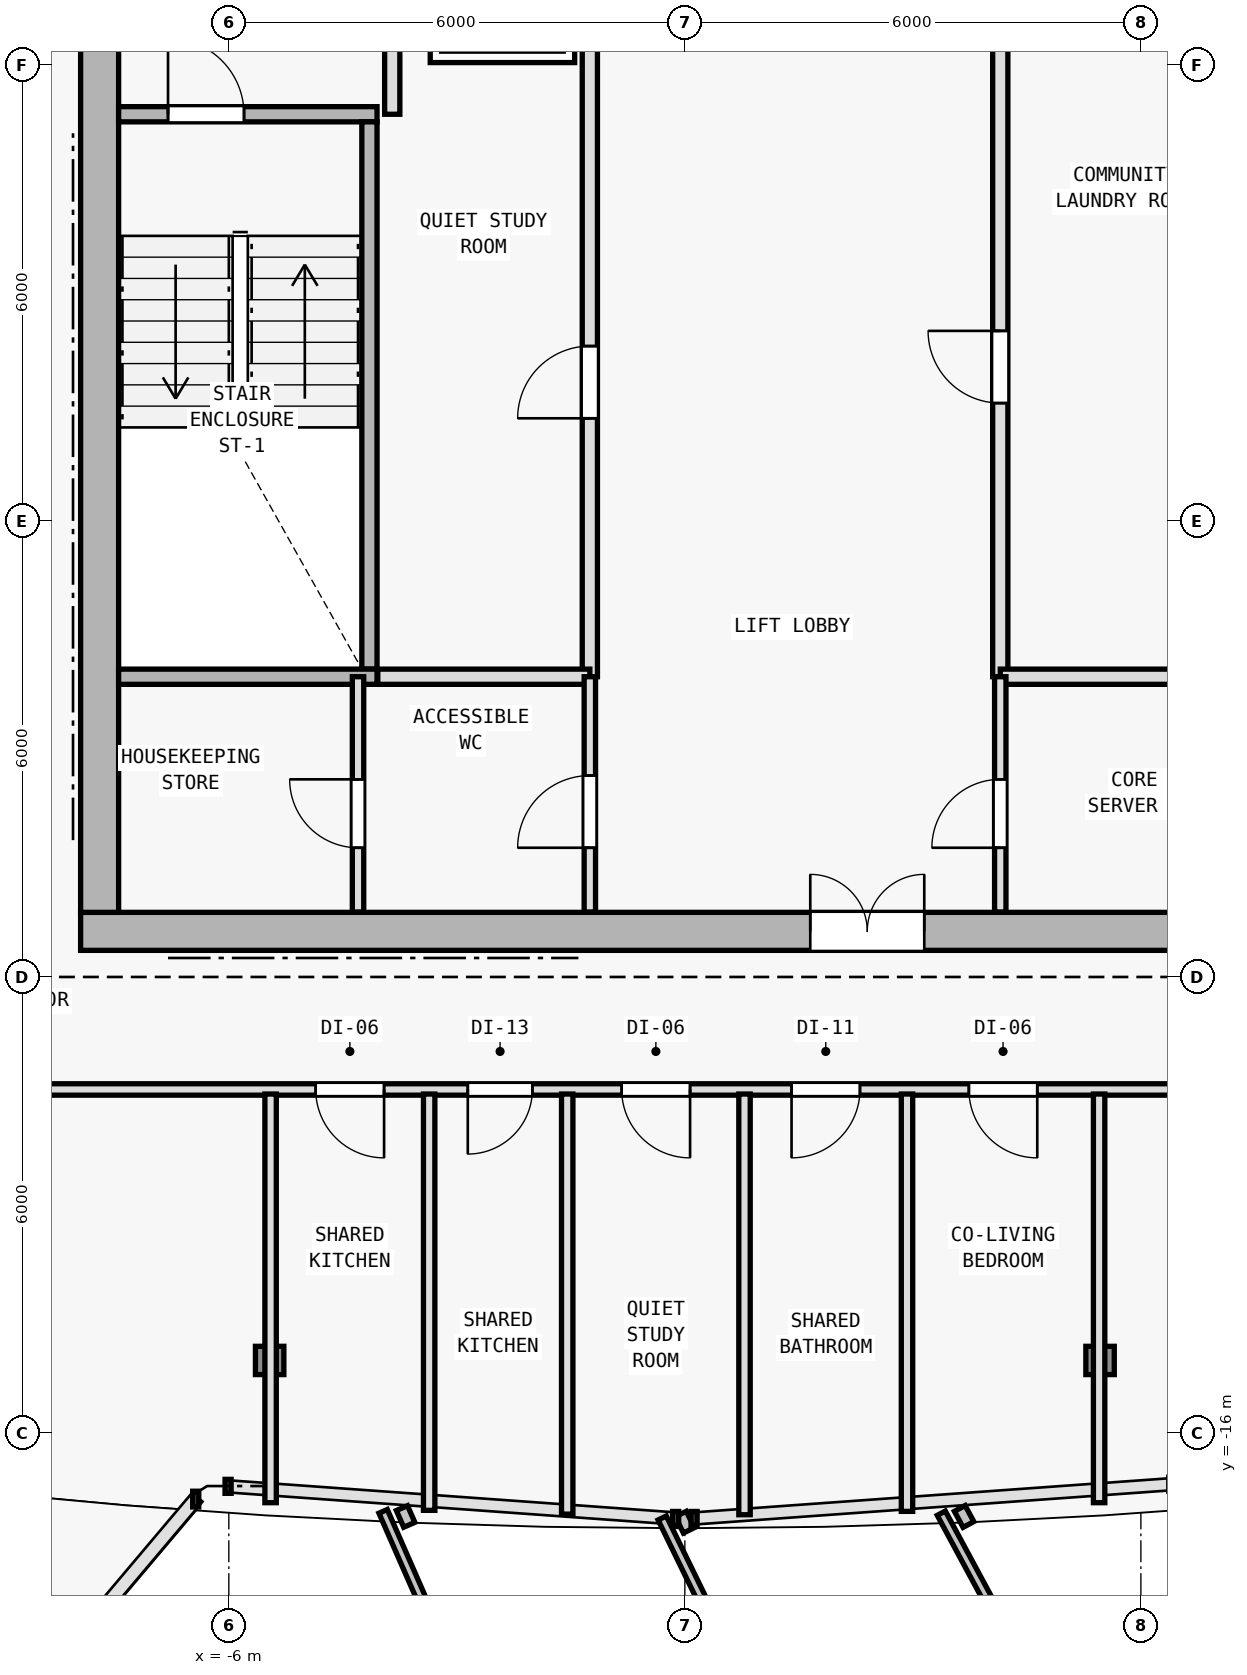
"""IFC4 building model, lengths in metres.
Left out: names, types, materials, properties, quantities, classifications, styles, units other than length and angle.
Written with IfcOpenShell. Run it as: python <this file> out.ifc"""

import sys

from ifc_helpers import new_model, si_unit, direction, frame, frame_2d, origin, origin_2d, place, context, subcontext, project, spatial, rectangle, i_section, extrude, element, fill, save


model = new_model("IFC4")
c1 = context("Model", 3, precision=1e-05, world=origin(), true_north=direction((0.0, 1.0)))
c2 = subcontext(c1, "Body", "Model", "MODEL_VIEW")
j1 = project(units=[si_unit("LENGTHUNIT", "METRE"), si_unit("PLANEANGLEUNIT", "RADIAN")], contexts=[c1])
p1 = place(None, origin())
s1 = spatial("IfcSite", under=j1, at=p1, CompositionType="ELEMENT")
p2 = place(p1, origin())
s2 = spatial("IfcBuilding", under=s1, at=p2, CompositionType="ELEMENT")
p3 = place(p2, frame((0.0, 0.0, 230.7)))
s3 = spatial("IfcBuildingStorey", under=s2, at=p3, CompositionType="ELEMENT", Elevation=230.7)
for number, where, z_axis, x_axis in (
    (1, (-7.7, -9.4, 0.0), (0.0, 0.0, 1.0), (1.0, 0.0, 0.0)),
    (2, (0.0, -9.4, 0.0), (0.0, 0.0, 1.0), (1.0, 0.0, 0.0)),
    (3, (-7.7, 2.0, 0.0), (0.0, 0.0, 1.0), (1.0, 0.0, 0.0)),
):
    element("IfcColumn", number, at=place(p3, frame(where, z_axis=z_axis, x_axis=x_axis)), inside=s3, PredefinedType="COLUMN", context=c2, shape_type="SweptSolid", body=[
        extrude(i_section(OverallWidth=0.398, OverallDepth=0.387, WebThickness=0.013, FlangeThickness=0.022, FilletRadius=0.015, at=origin_2d()), origin(), (0.0, 0.0, 1.0), 3.6),
    ])
for number, where, z_axis, x_axis in (
    (4, (-5.463, -15.045, 0.006), (0.007, 0.035, 0.999), (-0.981, 0.193, 0.0)),
    (5, (5.463, -15.045, 0.006), (-0.007, 0.035, 0.999), (-0.981, -0.193, 0.0)),
):
    element("IfcColumn", number, at=place(p3, frame(where, z_axis=z_axis, x_axis=x_axis)), inside=s3, PredefinedType="COLUMN", context=c2, shape_type="SweptSolid", body=[
        extrude(i_section(OverallWidth=0.374, OverallDepth=0.372, WebThickness=0.012, FlangeThickness=0.02, FilletRadius=0.015, at=origin_2d()), origin(), (0.0, 0.0, 1.0), 3.591),
    ])
p4 = place(p3, frame((-7.95, -9.4, 0.0), z_axis=(0.0, 0.0, 1.0), x_axis=(1.0, 0.0, 0.0)))
e6 = element("IfcWall", 6, at=p4, inside=s3, PredefinedType="SHEAR", context=c2, shape_type="SweptSolid", body=[
    extrude(rectangle(XDim=15.9, YDim=0.5, at=frame_2d((7.95, 0.0))), origin(), (0.0, 0.0, 1.0), 3.35),
])
p5 = place(p4, frame((9.6, 0.0, 0.0)))
e7 = element("IfcOpeningElement", 7, at=p5, cuts=e6, PredefinedType="OPENING", context=c2, shape_type="SweptSolid", body=[
    extrude(rectangle(XDim=1.5, YDim=2.2, at=frame_2d((0.75, 1.1))), frame((0.0, 0.26, 0.0), z_axis=(0.0, -1.0, 0.0), x_axis=(1.0, 0.0, 0.0)), (0.0, 0.0, 1.0), 0.52),
])
p6 = place(p3, frame((-7.7, -9.15, 0.0), z_axis=(0.0, 0.0, 1.0), x_axis=(0.0, 1.0, 0.0)))
e8 = element("IfcWall", 8, at=p6, inside=s3, PredefinedType="SHEAR", context=c2, shape_type="SweptSolid", body=[
    extrude(rectangle(XDim=19.1, YDim=0.5, at=frame_2d((9.55, 0.0))), origin(), (0.0, 0.0, 1.0), 3.35),
])
p7 = place(p6, frame((12.7, 0.0, 0.0)))
e9 = element("IfcOpeningElement", 9, at=p7, cuts=e8, PredefinedType="OPENING", context=c2, shape_type="SweptSolid", body=[
    extrude(rectangle(XDim=1.1, YDim=2.15, at=frame_2d((0.55, 1.075))), frame((0.0, 0.26, 0.0), z_axis=(0.0, -1.0, 0.0), x_axis=(1.0, 0.0, 0.0)), (0.0, 0.0, 1.0), 0.52),
])
p8 = place(p3, frame((-7.45, 1.35, 0.0), z_axis=(0.0, 0.0, 1.0), x_axis=(1.0, 0.0, 0.0)))
e10 = element("IfcWall", 10, at=p8, inside=s3, PredefinedType="SOLIDWALL", context=c2, shape_type="SweptSolid", body=[
    extrude(rectangle(XDim=3.4, YDim=0.2, at=frame_2d((1.7, 0.0))), origin(), (0.0, 0.0, 1.0), 3.35),
])
p9 = place(p8, frame((0.65, 0.0, 0.0)))
e11 = element("IfcOpeningElement", 11, at=p9, cuts=e10, PredefinedType="OPENING", context=c2, shape_type="SweptSolid", body=[
    extrude(rectangle(XDim=1.0, YDim=2.15, at=frame_2d((0.5, 1.075))), frame((0.0, 0.11, 0.0), z_axis=(0.0, -1.0, 0.0), x_axis=(1.0, 0.0, 0.0)), (0.0, 0.0, 1.0), 0.22),
])
p10 = place(p3, frame((-4.15, -5.95, 0.0), z_axis=(0.0, 0.0, 1.0), x_axis=(0.0, 1.0, 0.0)))
e12 = element("IfcWall", 12, at=p10, inside=s3, PredefinedType="SOLIDWALL", context=c2, shape_type="SweptSolid", body=[
    extrude(rectangle(XDim=7.2, YDim=0.2, at=frame_2d((3.6, 0.0))), origin(), (0.0, 0.0, 1.0), 3.35),
])
p11 = place(p3, frame((-3.85, 1.35, 0.0), z_axis=(0.0, 0.0, 1.0), x_axis=(0.0, 1.0, 0.0)))
e13 = element("IfcWall", 13, at=p11, inside=s3, PredefinedType="SOLIDWALL", context=c2, shape_type="SweptSolid", body=[
    extrude(rectangle(XDim=8.595, YDim=0.2, at=frame_2d((4.297, 0.0))), origin(), (0.0, 0.0, 1.0), 3.35),
])
p12 = place(p11, frame((1.5, 0.0, 0.0)))
e14 = element("IfcOpeningElement", 14, at=p12, cuts=e13, PredefinedType="OPENING", context=c2, shape_type="SweptSolid", body=[
    extrude(rectangle(XDim=1.0, YDim=2.15, at=frame_2d((0.5, 1.075))), frame((0.0, 0.11, 0.0), z_axis=(0.0, -1.0, 0.0), x_axis=(1.0, 0.0, 0.0)), (0.0, 0.0, 1.0), 0.22),
])
p13 = place(p11, frame((3.18, 0.0, 0.0)))
e15 = element("IfcOpeningElement", 15, at=p13, cuts=e13, PredefinedType="OPENING", context=c2, shape_type="SweptSolid", body=[
    extrude(rectangle(XDim=1.0, YDim=2.15, at=frame_2d((0.5, 1.075))), frame((0.0, 0.11, 0.0), z_axis=(0.0, -1.0, 0.0), x_axis=(1.0, 0.0, 0.0)), (0.0, 0.0, 1.0), 0.22),
])
p14 = place(p3, frame((4.15, -6.05, 0.0), z_axis=(0.0, 0.0, 1.0), x_axis=(0.0, 1.0, 0.0)))
e16 = element("IfcWall", 16, at=p14, inside=s3, PredefinedType="SOLIDWALL", context=c2, shape_type="SweptSolid", body=[
    extrude(rectangle(XDim=8.7, YDim=0.2, at=frame_2d((4.35, 0.0))), origin(), (0.0, 0.0, 1.0), 3.35),
])
p15 = place(p14, frame((3.6, 0.0, 0.0)))
e17 = element("IfcOpeningElement", 17, at=p15, cuts=e16, PredefinedType="OPENING", context=c2, shape_type="SweptSolid", body=[
    extrude(rectangle(XDim=0.95, YDim=2.1, at=frame_2d((0.475, 1.05))), frame((0.0, 0.11, 0.0), z_axis=(0.0, -1.0, 0.0), x_axis=(1.0, 0.0, 0.0)), (0.0, 0.0, 1.0), 0.22),
])
p16 = place(p3, frame((-1.25, -6.05, 0.0), z_axis=(0.0, 0.0, 1.0), x_axis=(0.0, 1.0, 0.0)))
e18 = element("IfcWall", 18, at=p16, inside=s3, PredefinedType="SOLIDWALL", context=c2, shape_type="SweptSolid", body=[
    extrude(rectangle(XDim=8.7, YDim=0.2, at=frame_2d((4.35, 0.0))), origin(), (0.0, 0.0, 1.0), 3.35),
])
p17 = place(p16, frame((3.4, 0.0, 0.0)))
e19 = element("IfcOpeningElement", 19, at=p17, cuts=e18, PredefinedType="OPENING", context=c2, shape_type="SweptSolid", body=[
    extrude(rectangle(XDim=0.95, YDim=2.1, at=frame_2d((0.475, 1.05))), frame((0.0, 0.11, 0.0), z_axis=(0.0, -1.0, 0.0), x_axis=(1.0, 0.0, 0.0)), (0.0, 0.0, 1.0), 0.22),
])
p18 = place(p3, frame((-7.45, -6.05, 0.0), z_axis=(0.0, 0.0, 1.0), x_axis=(1.0, 0.0, 0.0)))
e20 = element("IfcWall", 20, at=p18, inside=s3, PredefinedType="SOLIDWALL", context=c2, shape_type="SweptSolid", body=[
    extrude(rectangle(XDim=3.4, YDim=0.2, at=frame_2d((1.7, 0.0))), origin(), (0.0, 0.0, 1.0), 3.35),
])
p19 = place(p3, frame((-4.04, -6.05, 0.0), z_axis=(0.0, 0.0, 1.0), x_axis=(1.0, 0.0, 0.0)))
e21 = element("IfcWall", 21, at=p19, inside=s3, PredefinedType="SOLIDWALL", context=c2, shape_type="SweptSolid", body=[
    extrude(rectangle(XDim=2.79, YDim=0.2, at=frame_2d((1.395, 0.0))), origin(), (0.0, 0.0, 1.0), 3.35),
])
p20 = place(p3, frame((4.15, -6.05, 0.0), z_axis=(0.0, 0.0, 1.0), x_axis=(1.0, 0.0, 0.0)))
e22 = element("IfcWall", 22, at=p20, inside=s3, PredefinedType="SOLIDWALL", context=c2, shape_type="SweptSolid", body=[
    extrude(rectangle(XDim=3.295, YDim=0.2, at=frame_2d((1.647, 0.0))), origin(), (0.0, 0.0, 1.0), 3.35),
])
p21 = place(p3, frame((-1.25, -9.145, 0.0), z_axis=(0.0, 0.0, 1.0), x_axis=(0.0, 1.0, 0.0)))
e23 = element("IfcWall", 23, at=p21, inside=s3, PredefinedType="PARTITIONING", context=c2, shape_type="SweptSolid", body=[
    extrude(rectangle(XDim=3.095, YDim=0.15, at=frame_2d((1.547, 0.0))), origin(), (0.0, 0.0, 1.0), 3.35),
])
p22 = place(p21, frame((0.845, 0.0, 0.0)))
e24 = element("IfcOpeningElement", 24, at=p22, cuts=e23, PredefinedType="OPENING", context=c2, shape_type="SweptSolid", body=[
    extrude(rectangle(XDim=0.95, YDim=2.1, at=frame_2d((0.475, 1.05))), frame((0.0, 0.085, 0.0), z_axis=(0.0, -1.0, 0.0), x_axis=(1.0, 0.0, 0.0)), (0.0, 0.0, 1.0), 0.17),
])
p23 = place(p3, frame((4.15, -9.145, 0.0), z_axis=(0.0, 0.0, 1.0), x_axis=(0.0, 1.0, 0.0)))
e25 = element("IfcWall", 25, at=p23, inside=s3, PredefinedType="PARTITIONING", context=c2, shape_type="SweptSolid", body=[
    extrude(rectangle(XDim=3.095, YDim=0.15, at=frame_2d((1.547, 0.0))), origin(), (0.0, 0.0, 1.0), 3.35),
])
p24 = place(p23, frame((0.845, 0.0, 0.0)))
e26 = element("IfcOpeningElement", 26, at=p24, cuts=e25, PredefinedType="OPENING", context=c2, shape_type="SweptSolid", body=[
    extrude(rectangle(XDim=0.9, YDim=2.1, at=frame_2d((0.45, 1.05))), frame((0.0, 0.085, 0.0), z_axis=(0.0, -1.0, 0.0), x_axis=(1.0, 0.0, 0.0)), (0.0, 0.0, 1.0), 0.17),
])
p25 = place(p3, frame((-4.3, -9.145, 0.0), z_axis=(0.0, 0.0, 1.0), x_axis=(0.0, 1.0, 0.0)))
e27 = element("IfcWall", 27, at=p25, inside=s3, PredefinedType="PARTITIONING", context=c2, shape_type="SweptSolid", body=[
    extrude(rectangle(XDim=3.095, YDim=0.15, at=frame_2d((1.547, 0.0))), origin(), (0.0, 0.0, 1.0), 3.35),
])
p26 = place(p25, frame((0.845, 0.0, 0.0)))
e28 = element("IfcOpeningElement", 28, at=p26, cuts=e27, PredefinedType="OPENING", context=c2, shape_type="SweptSolid", body=[
    extrude(rectangle(XDim=0.9, YDim=2.1, at=frame_2d((0.45, 1.05))), frame((0.0, 0.085, 0.0), z_axis=(0.0, -1.0, 0.0), x_axis=(1.0, 0.0, 0.0)), (0.0, 0.0, 1.0), 0.17),
])
p27 = place(p3, frame((9.78, -11.48, 0.0), z_axis=(0.0, 0.0, 1.0), x_axis=(-1.0, 0.0, 0.0)))
e29 = element("IfcWall", 29, at=p27, inside=s3, PredefinedType="PARTITIONING", context=c2, shape_type="SweptSolid", body=[
    extrude(rectangle(XDim=19.56, YDim=0.15, at=frame_2d((9.78, 0.0))), origin(), (0.0, 0.0, 1.0), 3.005),
])
p28 = place(p27, frame((13.737, 0.0, 0.0)))
e30 = element("IfcOpeningElement", 30, at=p28, cuts=e29, PredefinedType="OPENING", context=c2, shape_type="SweptSolid", body=[
    extrude(rectangle(XDim=0.9, YDim=2.1, at=frame_2d((0.45, 1.05))), frame((0.0, 0.085, 0.0), z_axis=(0.0, -1.0, 0.0), x_axis=(1.0, 0.0, 0.0)), (0.0, 0.0, 1.0), 0.17),
])
p29 = place(p27, frame((11.786, 0.0, 0.0)))
e31 = element("IfcOpeningElement", 31, at=p29, cuts=e29, PredefinedType="OPENING", context=c2, shape_type="SweptSolid", body=[
    extrude(rectangle(XDim=0.85, YDim=2.1, at=frame_2d((0.425, 1.05))), frame((0.0, 0.085, 0.0), z_axis=(0.0, -1.0, 0.0), x_axis=(1.0, 0.0, 0.0)), (0.0, 0.0, 1.0), 0.17),
])
p30 = place(p27, frame((9.711, 0.0, 0.0)))
e32 = element("IfcOpeningElement", 32, at=p30, cuts=e29, PredefinedType="OPENING", context=c2, shape_type="SweptSolid", body=[
    extrude(rectangle(XDim=0.9, YDim=2.1, at=frame_2d((0.45, 1.05))), frame((0.0, 0.085, 0.0), z_axis=(0.0, -1.0, 0.0), x_axis=(1.0, 0.0, 0.0)), (0.0, 0.0, 1.0), 0.17),
])
p31 = place(p27, frame((7.476, 0.0, 0.0)))
e33 = element("IfcOpeningElement", 33, at=p31, cuts=e29, PredefinedType="OPENING", context=c2, shape_type="SweptSolid", body=[
    extrude(rectangle(XDim=0.9, YDim=2.1, at=frame_2d((0.45, 1.05))), frame((0.0, 0.085, 0.0), z_axis=(0.0, -1.0, 0.0), x_axis=(1.0, 0.0, 0.0)), (0.0, 0.0, 1.0), 0.17),
])
p32 = place(p27, frame((5.143, 0.0, 0.0)))
e34 = element("IfcOpeningElement", 34, at=p32, cuts=e29, PredefinedType="OPENING", context=c2, shape_type="SweptSolid", body=[
    extrude(rectangle(XDim=0.9, YDim=2.1, at=frame_2d((0.45, 1.05))), frame((0.0, 0.085, 0.0), z_axis=(0.0, -1.0, 0.0), x_axis=(1.0, 0.0, 0.0)), (0.0, 0.0, 1.0), 0.17),
])
p33 = place(p27, frame((1.804, 0.0, 0.0)))
e35 = element("IfcOpeningElement", 35, at=p33, cuts=e29, PredefinedType="OPENING", context=c2, shape_type="SweptSolid", body=[
    extrude(rectangle(XDim=0.9, YDim=2.1, at=frame_2d((0.45, 1.05))), frame((0.0, 0.085, 0.0), z_axis=(0.0, -1.0, 0.0), x_axis=(1.0, 0.0, 0.0)), (0.0, 0.0, 1.0), 0.17),
])
for number, where, z_axis, x_axis in (
    (36, (-5.45, -11.54, 0.0), (0.0, 0.0, 1.0), (0.0, -1.0, 0.0)),
    (37, (5.45, -11.54, 0.0), (0.0, 0.0, 1.0), (0.0, -1.0, 0.0)),
):
    element("IfcWall", number, at=place(p3, frame(where, z_axis=z_axis, x_axis=x_axis)), inside=s3, PredefinedType="PARTITIONING", context=c2, shape_type="SweptSolid", body=[
        extrude(rectangle(XDim=5.376, YDim=0.15, at=frame_2d((2.688, 0.0))), origin(), (0.0, 0.0, 1.0), 2.775),
    ])
p34 = place(p3, frame((0.785, -11.54, 0.0), z_axis=(0.0, 0.0, 1.0), x_axis=(0.0, -1.0, 0.0)))
e38 = element("IfcWall", 38, at=p34, inside=s3, PredefinedType="PARTITIONING", context=c2, shape_type="SweptSolid", body=[
    extrude(rectangle(XDim=5.535, YDim=0.15, at=frame_2d((2.767, 0.0))), origin(), (0.0, 0.0, 1.0), 2.775),
])
p35 = place(p3, frame((-1.548, -11.54, 0.0), z_axis=(0.0, 0.0, 1.0), x_axis=(-4.4173514e-05, -0.999999999024, 0.0)))
e39 = element("IfcWall", 39, at=p35, inside=s3, PredefinedType="PARTITIONING", context=c2, shape_type="SweptSolid", body=[
    extrude(rectangle(XDim=5.527, YDim=0.15, at=frame_2d((2.763, 0.0))), origin(), (0.0, 0.0, 1.0), 2.775),
])
p36 = place(p3, frame((2.923, -11.54, 0.0), z_axis=(0.0, 0.0, 1.0), x_axis=(-4.4466183e-05, -0.999999999011, 0.0)))
e40 = element("IfcWall", 40, at=p36, inside=s3, PredefinedType="PARTITIONING", context=c2, shape_type="SweptSolid", body=[
    extrude(rectangle(XDim=5.49, YDim=0.15, at=frame_2d((2.745, 0.0))), origin(), (0.0, 0.0, 1.0), 2.775),
])
p37 = place(p3, frame((-3.364, -11.54, 0.0), z_axis=(0.0, 0.0, 1.0), x_axis=(0.0, -1.0, 0.0)))
e41 = element("IfcWall", 41, at=p37, inside=s3, PredefinedType="PARTITIONING", context=c2, shape_type="SweptSolid", body=[
    extrude(rectangle(XDim=5.477, YDim=0.15, at=frame_2d((2.739, 0.0))), origin(), (0.0, 0.0, 1.0), 2.975),
])
p38 = place(p5, origin())
e42 = element("IfcDoor", 42, at=p38, inside=s3, OperationType="DOUBLE_DOOR_SINGLE_SWING", PredefinedType="DOOR", context=c2, shape_type="SweptSolid", body=[
    extrude(rectangle(XDim=1.5, YDim=2.2, at=frame_2d((0.75, 1.1))), frame((0.0, 0.025, 0.0), z_axis=(0.0, -1.0, 0.0), x_axis=(1.0, 0.0, 0.0)), (0.0, 0.0, 1.0), 0.05),
])
fill(e7, e42)
p39 = place(p9, origin())
e43 = element("IfcDoor", 43, at=p39, inside=s3, OperationType="SINGLE_SWING_LEFT", PredefinedType="DOOR", context=c2, shape_type="SweptSolid", body=[
    extrude(rectangle(XDim=1.0, YDim=2.15, at=frame_2d((0.5, 1.075))), frame((0.0, 0.025, 0.0), z_axis=(0.0, -1.0, 0.0), x_axis=(1.0, 0.0, 0.0)), (0.0, 0.0, 1.0), 0.05),
])
fill(e11, e43)
p40 = place(p15, origin())
e44 = element("IfcDoor", 44, at=p40, inside=s3, OperationType="SINGLE_SWING_RIGHT", PredefinedType="DOOR", context=c2, shape_type="SweptSolid", body=[
    extrude(rectangle(XDim=0.95, YDim=2.1, at=frame_2d((0.475, 1.05))), frame((0.0, 0.025, 0.0), z_axis=(0.0, -1.0, 0.0), x_axis=(1.0, 0.0, 0.0)), (0.0, 0.0, 1.0), 0.05),
])
fill(e17, e44)
p41 = place(p17, origin())
e45 = element("IfcDoor", 45, at=p41, inside=s3, OperationType="SINGLE_SWING_LEFT", PredefinedType="DOOR", context=c2, shape_type="SweptSolid", body=[
    extrude(rectangle(XDim=0.95, YDim=2.1, at=frame_2d((0.475, 1.05))), frame((0.0, 0.025, 0.0), z_axis=(0.0, -1.0, 0.0), x_axis=(1.0, 0.0, 0.0)), (0.0, 0.0, 1.0), 0.05),
])
fill(e19, e45)
p42 = place(p22, origin())
e46 = element("IfcDoor", 46, at=p42, inside=s3, OperationType="SINGLE_SWING_LEFT", PredefinedType="DOOR", context=c2, shape_type="SweptSolid", body=[
    extrude(rectangle(XDim=0.95, YDim=2.1, at=frame_2d((0.475, 1.05))), frame((0.0, 0.025, 0.0), z_axis=(0.0, -1.0, 0.0), x_axis=(1.0, 0.0, 0.0)), (0.0, 0.0, 1.0), 0.05),
])
fill(e24, e46)
p43 = place(p26, origin())
e47 = element("IfcDoor", 47, at=p43, inside=s3, OperationType="SINGLE_SWING_RIGHT", PredefinedType="DOOR", context=c2, shape_type="SweptSolid", body=[
    extrude(rectangle(XDim=0.9, YDim=2.1, at=frame_2d((0.45, 1.05))), frame((0.0, 0.025, 0.0), z_axis=(0.0, -1.0, 0.0), x_axis=(1.0, 0.0, 0.0)), (0.0, 0.0, 1.0), 0.05),
])
fill(e28, e47)
p44 = place(p24, origin())
e48 = element("IfcDoor", 48, at=p44, inside=s3, OperationType="SINGLE_SWING_LEFT", PredefinedType="DOOR", context=c2, shape_type="SweptSolid", body=[
    extrude(rectangle(XDim=0.9, YDim=2.1, at=frame_2d((0.45, 1.05))), frame((0.0, 0.025, 0.0), z_axis=(0.0, -1.0, 0.0), x_axis=(1.0, 0.0, 0.0)), (0.0, 0.0, 1.0), 0.05),
])
fill(e26, e48)
p45 = place(p28, origin())
e49 = element("IfcDoor", 49, at=p45, inside=s3, OperationType="SINGLE_SWING_LEFT", PredefinedType="DOOR", context=c2, shape_type="SweptSolid", body=[
    extrude(rectangle(XDim=0.9, YDim=2.1, at=frame_2d((0.45, 1.05))), frame((0.0, 0.025, 0.0), z_axis=(0.0, -1.0, 0.0), x_axis=(1.0, 0.0, 0.0)), (0.0, 0.0, 1.0), 0.05),
])
fill(e30, e49)
p46 = place(p29, origin())
e50 = element("IfcDoor", 50, at=p46, inside=s3, OperationType="SINGLE_SWING_RIGHT", PredefinedType="DOOR", context=c2, shape_type="SweptSolid", body=[
    extrude(rectangle(XDim=0.85, YDim=2.1, at=frame_2d((0.425, 1.05))), frame((0.0, 0.025, 0.0), z_axis=(0.0, -1.0, 0.0), x_axis=(1.0, 0.0, 0.0)), (0.0, 0.0, 1.0), 0.05),
])
fill(e31, e50)
p47 = place(p30, origin())
e51 = element("IfcDoor", 51, at=p47, inside=s3, OperationType="SINGLE_SWING_LEFT", PredefinedType="DOOR", context=c2, shape_type="SweptSolid", body=[
    extrude(rectangle(XDim=0.9, YDim=2.1, at=frame_2d((0.45, 1.05))), frame((0.0, 0.025, 0.0), z_axis=(0.0, -1.0, 0.0), x_axis=(1.0, 0.0, 0.0)), (0.0, 0.0, 1.0), 0.05),
])
fill(e32, e51)
p48 = place(p31, origin())
e52 = element("IfcDoor", 52, at=p48, inside=s3, OperationType="SINGLE_SWING_RIGHT", PredefinedType="DOOR", context=c2, shape_type="SweptSolid", body=[
    extrude(rectangle(XDim=0.9, YDim=2.1, at=frame_2d((0.45, 1.05))), frame((0.0, 0.025, 0.0), z_axis=(0.0, -1.0, 0.0), x_axis=(1.0, 0.0, 0.0)), (0.0, 0.0, 1.0), 0.05),
])
fill(e33, e52)
p49 = place(p32, origin())
e53 = element("IfcDoor", 53, at=p49, inside=s3, OperationType="SINGLE_SWING_LEFT", PredefinedType="DOOR", context=c2, shape_type="SweptSolid", body=[
    extrude(rectangle(XDim=0.9, YDim=2.1, at=frame_2d((0.45, 1.05))), frame((0.0, 0.025, 0.0), z_axis=(0.0, -1.0, 0.0), x_axis=(1.0, 0.0, 0.0)), (0.0, 0.0, 1.0), 0.05),
])
fill(e34, e53)
save(model, sys.argv[1])
